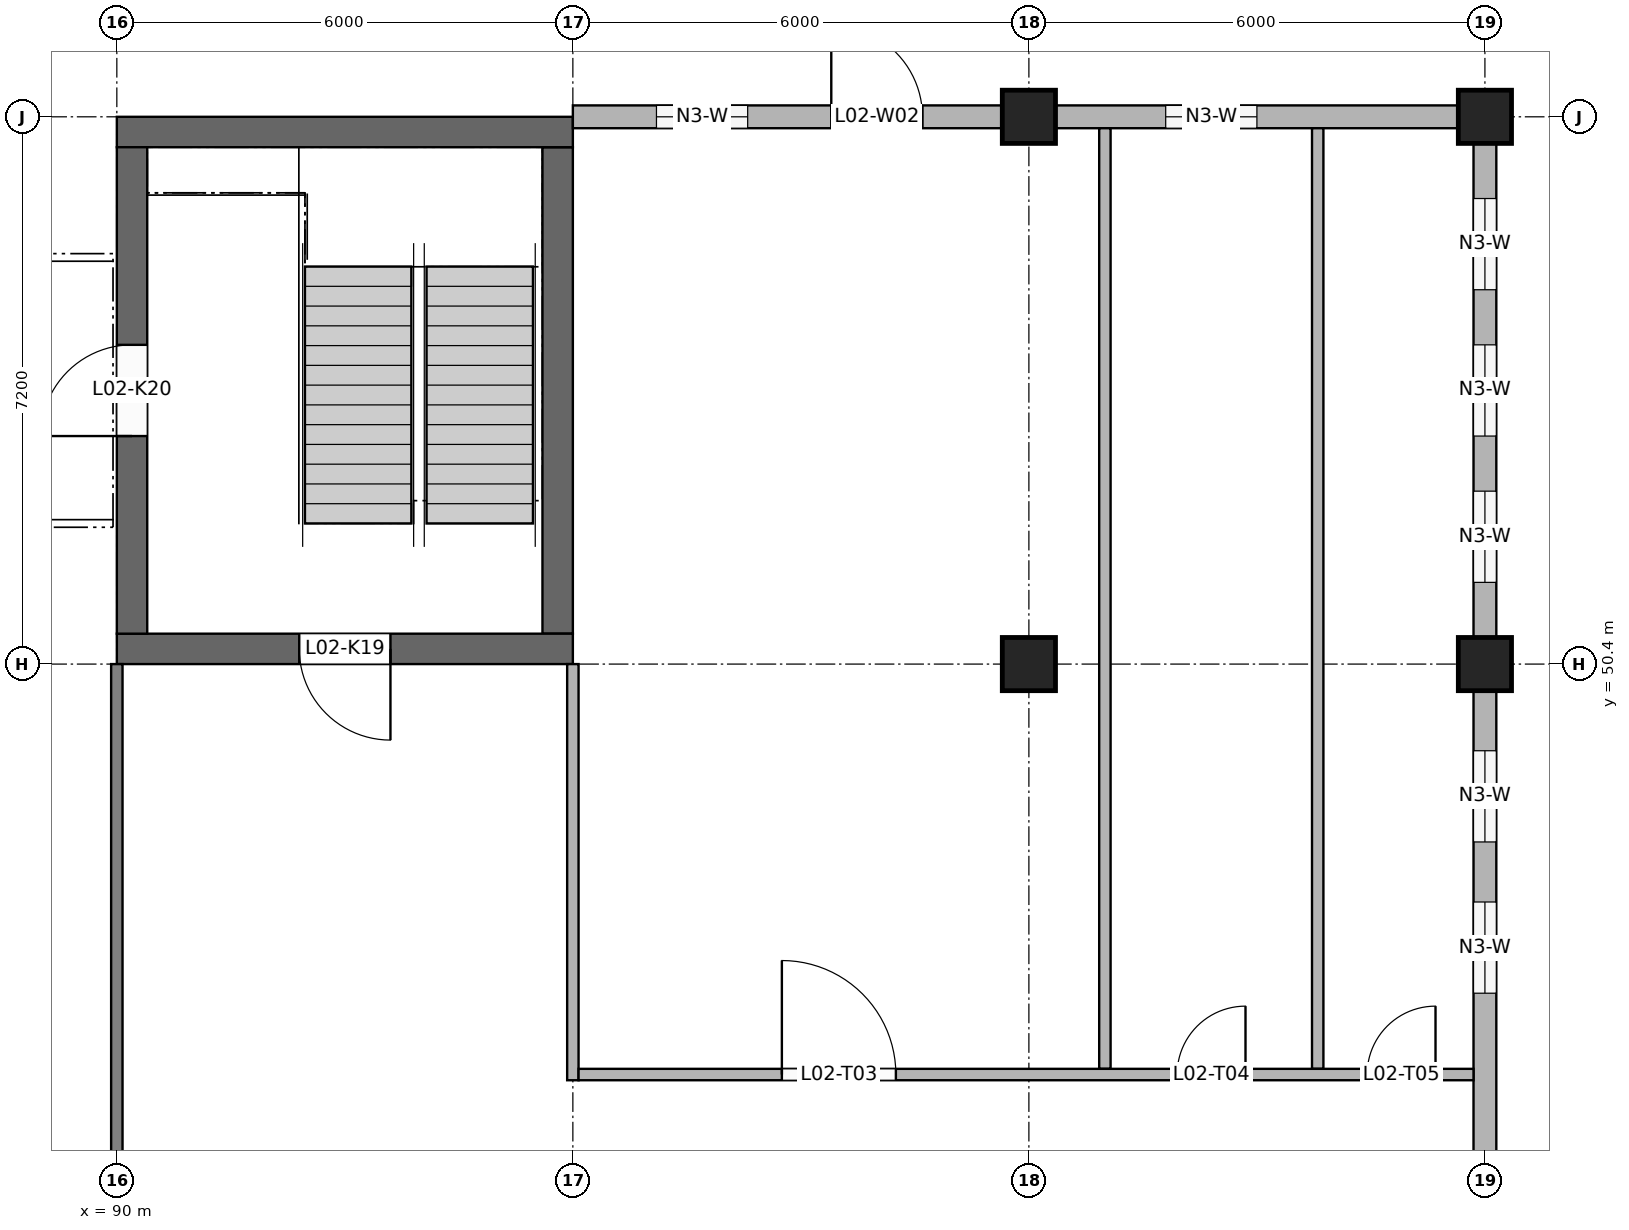
"""IFC4 building model, lengths in metres.
Left out: names, types, materials, properties, quantities, classifications, styles, units other than length and angle.
Written with IfcOpenShell. Run it as: python <this file> out.ifc"""

import sys

from ifc_helpers import new_model, si_unit, direction, frame, frame_2d, origin, origin_2d, place, context, subcontext, project, spatial, rectangle, extrude, element, fill, save


model = new_model("IFC4")
c1 = context("Model", 3, precision=1e-05, world=origin(), true_north=direction((0.0, 1.0)))
c2 = subcontext(c1, "Body", "Model", "MODEL_VIEW")
j1 = project(units=[si_unit("LENGTHUNIT", "METRE"), si_unit("PLANEANGLEUNIT", "RADIAN")], contexts=[c1])
p1 = place(None, origin())
s1 = spatial("IfcSite", under=j1, at=p1, CompositionType="ELEMENT")
p2 = place(p1, origin())
s2 = spatial("IfcBuilding", under=s1, at=p2, CompositionType="ELEMENT")
p3 = place(p2, frame((0.0, 0.0, 8.4)))
s3 = spatial("IfcBuildingStorey", under=s2, at=p3, CompositionType="ELEMENT", Elevation=8.4)
p4 = place(p3, frame((90.0, 50.6, 0.0), z_axis=(0.0, 0.0, 1.0), x_axis=(1.0, 0.0, 0.0)))
e1 = element("IfcWall", 1, at=p4, inside=s3, PredefinedType="SHEAR", context=c2, shape_type="SweptSolid", body=[
    extrude(rectangle(XDim=6.0, YDim=0.4, at=frame_2d((3.0, 0.0))), origin(), (0.0, 0.0, 1.0), 4.0),
])
p5 = place(p4, frame((2.4, 0.0, 0.0)))
e2 = element("IfcOpeningElement", 2, at=p5, cuts=e1, PredefinedType="OPENING", context=c2, shape_type="SweptSolid", body=[
    extrude(rectangle(XDim=1.2, YDim=2.1, at=frame_2d((0.6, 1.05))), frame((0.0, 0.21, 0.0), z_axis=(0.0, -1.0, 0.0), x_axis=(1.0, 0.0, 0.0)), (0.0, 0.0, 1.0), 0.42),
])
p6 = place(p3, frame((90.0, 57.4, 0.0), z_axis=(0.0, 0.0, 1.0), x_axis=(1.0, 0.0, 0.0)))
e3 = element("IfcWall", 3, at=p6, inside=s3, PredefinedType="SHEAR", context=c2, shape_type="SweptSolid", body=[
    extrude(rectangle(XDim=6.0, YDim=0.4, at=frame_2d((3.0, 0.0))), origin(), (0.0, 0.0, 1.0), 4.0),
])
p7 = place(p3, frame((90.2, 50.8, 0.0), z_axis=(0.0, 0.0, 1.0), x_axis=(0.0, 1.0, 0.0)))
e4 = element("IfcWall", 4, at=p7, inside=s3, PredefinedType="SHEAR", context=c2, shape_type="SweptSolid", body=[
    extrude(rectangle(XDim=6.4, YDim=0.4, at=frame_2d((3.2, 0.0))), origin(), (0.0, 0.0, 1.0), 4.0),
])
p8 = place(p7, frame((2.6, 0.0, 0.0)))
e5 = element("IfcOpeningElement", 5, at=p8, cuts=e4, PredefinedType="OPENING", context=c2, shape_type="SweptSolid", body=[
    extrude(rectangle(XDim=1.2, YDim=2.1, at=frame_2d((0.6, 1.05))), frame((0.0, 0.21, 0.0), z_axis=(0.0, -1.0, 0.0), x_axis=(1.0, 0.0, 0.0)), (0.0, 0.0, 1.0), 0.42),
])
p9 = place(p3, frame((95.8, 50.8, 0.0), z_axis=(0.0, 0.0, 1.0), x_axis=(0.0, 1.0, 0.0)))
e6 = element("IfcWall", 6, at=p9, inside=s3, PredefinedType="SHEAR", context=c2, shape_type="SweptSolid", body=[
    extrude(rectangle(XDim=6.4, YDim=0.4, at=frame_2d((3.2, 0.0))), origin(), (0.0, 0.0, 1.0), 4.0),
])
for number, where, z_axis, x_axis in (
    (7, (102.0, 50.4, 0.0), (0.0, 0.0, 1.0), (1.0, 0.0, 0.0)),
    (8, (108.0, 50.4, 0.0), (0.0, 0.0, 1.0), (1.0, 0.0, 0.0)),
    (9, (102.0, 57.6, 0.0), (0.0, 0.0, 1.0), (1.0, 0.0, 0.0)),
    (10, (108.0, 57.6, 0.0), (0.0, 0.0, 1.0), (1.0, 0.0, 0.0)),
):
    element("IfcColumn", number, at=place(p3, frame(where, z_axis=z_axis, x_axis=x_axis)), inside=s3, PredefinedType="COLUMN", context=c2, shape_type="SweptSolid", body=[
        extrude(rectangle(XDim=0.7, YDim=0.7, at=origin_2d()), origin(), (0.0, 0.0, 1.0), 4.0),
    ])
p10 = place(p3, frame((108.0, 43.2, 0.0), z_axis=(0.0, 0.0, 1.0), x_axis=(0.0, 1.0, 0.0)))
e11 = element("IfcWall", 11, at=p10, inside=s3, PredefinedType="SOLIDWALL", context=c2, shape_type="SweptSolid", body=[
    extrude(rectangle(XDim=6.85, YDim=0.3, at=frame_2d((3.425, 0.0))), origin(), (0.0, 0.0, 1.0), 3.1),
])
p11 = place(p10, frame((2.87, 0.0, 0.9)))
e12 = element("IfcOpeningElement", 12, at=p11, cuts=e11, PredefinedType="OPENING", context=c2, shape_type="SweptSolid", body=[
    extrude(rectangle(XDim=1.2, YDim=1.5, at=frame_2d((0.6, 0.75))), frame((0.0, 0.16, 0.0), z_axis=(0.0, -1.0, 0.0), x_axis=(1.0, 0.0, 0.0)), (0.0, 0.0, 1.0), 0.32),
])
p12 = place(p10, frame((4.86, 0.0, 0.9)))
e13 = element("IfcOpeningElement", 13, at=p12, cuts=e11, PredefinedType="OPENING", context=c2, shape_type="SweptSolid", body=[
    extrude(rectangle(XDim=1.2, YDim=1.5, at=frame_2d((0.6, 0.75))), frame((0.0, 0.16, 0.0), z_axis=(0.0, -1.0, 0.0), x_axis=(1.0, 0.0, 0.0)), (0.0, 0.0, 1.0), 0.32),
])
p13 = place(p3, frame((108.0, 50.75, 0.0), z_axis=(0.0, 0.0, 1.0), x_axis=(0.0, 1.0, 0.0)))
e14 = element("IfcWall", 14, at=p13, inside=s3, PredefinedType="SOLIDWALL", context=c2, shape_type="SweptSolid", body=[
    extrude(rectangle(XDim=6.5, YDim=0.3, at=frame_2d((3.25, 0.0))), origin(), (0.0, 0.0, 1.0), 3.2),
])
p14 = place(p13, frame((0.725, 0.0, 0.9)))
e15 = element("IfcOpeningElement", 15, at=p14, cuts=e14, PredefinedType="OPENING", context=c2, shape_type="SweptSolid", body=[
    extrude(rectangle(XDim=1.2, YDim=1.5, at=frame_2d((0.6, 0.75))), frame((0.0, 0.16, 0.0), z_axis=(0.0, -1.0, 0.0), x_axis=(1.0, 0.0, 0.0)), (0.0, 0.0, 1.0), 0.32),
])
p15 = place(p13, frame((2.65, 0.0, 0.9)))
e16 = element("IfcOpeningElement", 16, at=p15, cuts=e14, PredefinedType="OPENING", context=c2, shape_type="SweptSolid", body=[
    extrude(rectangle(XDim=1.2, YDim=1.5, at=frame_2d((0.6, 0.75))), frame((0.0, 0.16, 0.0), z_axis=(0.0, -1.0, 0.0), x_axis=(1.0, 0.0, 0.0)), (0.0, 0.0, 1.0), 0.32),
])
p16 = place(p13, frame((4.575, 0.0, 0.9)))
e17 = element("IfcOpeningElement", 17, at=p16, cuts=e14, PredefinedType="OPENING", context=c2, shape_type="SweptSolid", body=[
    extrude(rectangle(XDim=1.2, YDim=1.5, at=frame_2d((0.6, 0.75))), frame((0.0, 0.16, 0.0), z_axis=(0.0, -1.0, 0.0), x_axis=(1.0, 0.0, 0.0)), (0.0, 0.0, 1.0), 0.32),
])
p17 = place(p3, frame((96.0, 57.6, 0.0), z_axis=(0.0, 0.0, 1.0), x_axis=(1.0, 0.0, 0.0)))
e18 = element("IfcWall", 18, at=p17, inside=s3, PredefinedType="SOLIDWALL", context=c2, shape_type="SweptSolid", body=[
    extrude(rectangle(XDim=5.65, YDim=0.3, at=frame_2d((2.825, 0.0))), origin(), (0.0, 0.0, 1.0), 3.2),
])
p18 = place(p17, frame((3.4, 0.0, 0.0)))
e19 = element("IfcOpeningElement", 19, at=p18, cuts=e18, PredefinedType="OPENING", context=c2, shape_type="SweptSolid", body=[
    extrude(rectangle(XDim=1.2, YDim=2.4, at=frame_2d((0.6, 1.2))), frame((0.0, 0.16, 0.0), z_axis=(0.0, -1.0, 0.0), x_axis=(1.0, 0.0, 0.0)), (0.0, 0.0, 1.0), 0.32),
])
p19 = place(p17, frame((1.1, 0.0, 0.9)))
e20 = element("IfcOpeningElement", 20, at=p19, cuts=e18, PredefinedType="OPENING", context=c2, shape_type="SweptSolid", body=[
    extrude(rectangle(XDim=1.2, YDim=1.5, at=frame_2d((0.6, 0.75))), frame((0.0, 0.16, 0.0), z_axis=(0.0, -1.0, 0.0), x_axis=(1.0, 0.0, 0.0)), (0.0, 0.0, 1.0), 0.32),
])
p20 = place(p3, frame((102.35, 57.6, 0.0), z_axis=(0.0, 0.0, 1.0), x_axis=(1.0, 0.0, 0.0)))
e21 = element("IfcWall", 21, at=p20, inside=s3, PredefinedType="SOLIDWALL", context=c2, shape_type="SweptSolid", body=[
    extrude(rectangle(XDim=5.3, YDim=0.3, at=frame_2d((2.65, 0.0))), origin(), (0.0, 0.0, 1.0), 3.3),
])
p21 = place(p20, frame((1.45, 0.0, 0.9)))
e22 = element("IfcOpeningElement", 22, at=p21, cuts=e21, PredefinedType="OPENING", context=c2, shape_type="SweptSolid", body=[
    extrude(rectangle(XDim=1.2, YDim=1.5, at=frame_2d((0.6, 0.75))), frame((0.0, 0.16, 0.0), z_axis=(0.0, -1.0, 0.0), x_axis=(1.0, 0.0, 0.0)), (0.0, 0.0, 1.0), 0.32),
])
p22 = place(p3, frame((96.0, 44.925, 0.0), z_axis=(0.0, 0.0, 1.0), x_axis=(0.0, 1.0, 0.0)))
e23 = element("IfcWall", 23, at=p22, inside=s3, PredefinedType="PARTITIONING", context=c2, shape_type="SweptSolid", body=[
    extrude(rectangle(XDim=5.475, YDim=0.15, at=frame_2d((2.737, 0.0))), origin(), (0.0, 0.0, 1.0), 4.0),
])
for number, where, z_axis, x_axis in (
    (24, (103.0, 45.075, 0.0), (0.0, 0.0, 1.0), (0.0, 1.0, 0.0)),
    (25, (105.8, 45.075, 0.0), (0.0, 0.0, 1.0), (0.0, 1.0, 0.0)),
):
    element("IfcWall", number, at=place(p3, frame(where, z_axis=z_axis, x_axis=x_axis)), inside=s3, PredefinedType="PARTITIONING", context=c2, shape_type="SweptSolid", body=[
        extrude(rectangle(XDim=12.375, YDim=0.15, at=frame_2d((6.188, 0.0))), origin(), (0.0, 0.0, 1.0), 3.3),
    ])
p23 = place(p3, frame((96.075, 45.0, 0.0), z_axis=(0.0, 0.0, 1.0), x_axis=(1.0, 0.0, 0.0)))
e26 = element("IfcWall", 26, at=p23, inside=s3, PredefinedType="PARTITIONING", context=c2, shape_type="SweptSolid", body=[
    extrude(rectangle(XDim=11.775, YDim=0.15, at=frame_2d((5.888, 0.0))), origin(), (0.0, 0.0, 1.0), 4.0),
])
p24 = place(p23, frame((2.675, 0.0, 0.0)))
e27 = element("IfcOpeningElement", 27, at=p24, cuts=e26, PredefinedType="OPENING", context=c2, shape_type="SweptSolid", body=[
    extrude(rectangle(XDim=1.5, YDim=2.1, at=frame_2d((0.75, 1.05))), frame((0.0, 0.085, 0.0), z_axis=(0.0, -1.0, 0.0), x_axis=(1.0, 0.0, 0.0)), (0.0, 0.0, 1.0), 0.17),
])
p25 = place(p23, frame((7.875, 0.0, 0.0)))
e28 = element("IfcOpeningElement", 28, at=p25, cuts=e26, PredefinedType="OPENING", context=c2, shape_type="SweptSolid", body=[
    extrude(rectangle(XDim=0.9, YDim=2.1, at=frame_2d((0.45, 1.05))), frame((0.0, 0.085, 0.0), z_axis=(0.0, -1.0, 0.0), x_axis=(1.0, 0.0, 0.0)), (0.0, 0.0, 1.0), 0.17),
])
p26 = place(p23, frame((10.375, 0.0, 0.0)))
e29 = element("IfcOpeningElement", 29, at=p26, cuts=e26, PredefinedType="OPENING", context=c2, shape_type="SweptSolid", body=[
    extrude(rectangle(XDim=0.9, YDim=2.1, at=frame_2d((0.45, 1.05))), frame((0.0, 0.085, 0.0), z_axis=(0.0, -1.0, 0.0), x_axis=(1.0, 0.0, 0.0)), (0.0, 0.0, 1.0), 0.17),
])
p27 = place(p11, origin())
e30 = element("IfcWindow", 30, at=p27, inside=s3, PartitioningType="SINGLE_PANEL", PredefinedType="WINDOW", context=c2, shape_type="SweptSolid", body=[
    extrude(rectangle(XDim=1.2, YDim=1.5, at=frame_2d((0.6, 0.75))), frame((0.0, 0.03, 0.0), z_axis=(0.0, -1.0, 0.0), x_axis=(1.0, 0.0, 0.0)), (0.0, 0.0, 1.0), 0.06),
])
fill(e12, e30)
p28 = place(p12, origin())
e31 = element("IfcWindow", 31, at=p28, inside=s3, PartitioningType="SINGLE_PANEL", PredefinedType="WINDOW", context=c2, shape_type="SweptSolid", body=[
    extrude(rectangle(XDim=1.2, YDim=1.5, at=frame_2d((0.6, 0.75))), frame((0.0, 0.03, 0.0), z_axis=(0.0, -1.0, 0.0), x_axis=(1.0, 0.0, 0.0)), (0.0, 0.0, 1.0), 0.06),
])
fill(e13, e31)
p29 = place(p14, origin())
e32 = element("IfcWindow", 32, at=p29, inside=s3, PartitioningType="SINGLE_PANEL", PredefinedType="WINDOW", context=c2, shape_type="SweptSolid", body=[
    extrude(rectangle(XDim=1.2, YDim=1.5, at=frame_2d((0.6, 0.75))), frame((0.0, 0.03, 0.0), z_axis=(0.0, -1.0, 0.0), x_axis=(1.0, 0.0, 0.0)), (0.0, 0.0, 1.0), 0.06),
])
fill(e15, e32)
p30 = place(p15, origin())
e33 = element("IfcWindow", 33, at=p30, inside=s3, PartitioningType="SINGLE_PANEL", PredefinedType="WINDOW", context=c2, shape_type="SweptSolid", body=[
    extrude(rectangle(XDim=1.2, YDim=1.5, at=frame_2d((0.6, 0.75))), frame((0.0, 0.03, 0.0), z_axis=(0.0, -1.0, 0.0), x_axis=(1.0, 0.0, 0.0)), (0.0, 0.0, 1.0), 0.06),
])
fill(e16, e33)
p31 = place(p16, origin())
e34 = element("IfcWindow", 34, at=p31, inside=s3, PartitioningType="SINGLE_PANEL", PredefinedType="WINDOW", context=c2, shape_type="SweptSolid", body=[
    extrude(rectangle(XDim=1.2, YDim=1.5, at=frame_2d((0.6, 0.75))), frame((0.0, 0.03, 0.0), z_axis=(0.0, -1.0, 0.0), x_axis=(1.0, 0.0, 0.0)), (0.0, 0.0, 1.0), 0.06),
])
fill(e17, e34)
p32 = place(p18, origin())
e35 = element("IfcDoor", 35, at=p32, inside=s3, OperationType="SINGLE_SWING_LEFT", PredefinedType="DOOR", context=c2, shape_type="SweptSolid", body=[
    extrude(rectangle(XDim=1.2, YDim=2.4, at=frame_2d((0.6, 1.2))), frame((0.0, 0.025, 0.0), z_axis=(0.0, -1.0, 0.0), x_axis=(1.0, 0.0, 0.0)), (0.0, 0.0, 1.0), 0.05),
])
fill(e19, e35)
p33 = place(p19, origin())
e36 = element("IfcWindow", 36, at=p33, inside=s3, PartitioningType="SINGLE_PANEL", PredefinedType="WINDOW", context=c2, shape_type="SweptSolid", body=[
    extrude(rectangle(XDim=1.2, YDim=1.5, at=frame_2d((0.6, 0.75))), frame((0.0, 0.03, 0.0), z_axis=(0.0, -1.0, 0.0), x_axis=(1.0, 0.0, 0.0)), (0.0, 0.0, 1.0), 0.06),
])
fill(e20, e36)
p34 = place(p21, origin())
e37 = element("IfcWindow", 37, at=p34, inside=s3, PartitioningType="SINGLE_PANEL", PredefinedType="WINDOW", context=c2, shape_type="SweptSolid", body=[
    extrude(rectangle(XDim=1.2, YDim=1.5, at=frame_2d((0.6, 0.75))), frame((0.0, 0.03, 0.0), z_axis=(0.0, -1.0, 0.0), x_axis=(1.0, 0.0, 0.0)), (0.0, 0.0, 1.0), 0.06),
])
fill(e22, e37)
p35 = place(p5, frame((1.2, 0.0, 0.0), z_axis=(0.0, 0.0, 1.0), x_axis=(-1.0, 0.0, 0.0)))
e38 = element("IfcDoor", 38, at=p35, inside=s3, OperationType="SINGLE_SWING_LEFT", PredefinedType="DOOR", context=c2, shape_type="SweptSolid", body=[
    extrude(rectangle(XDim=1.2, YDim=2.1, at=frame_2d((0.6, 1.05))), frame((0.0, 0.025, 0.0), z_axis=(0.0, -1.0, 0.0), x_axis=(1.0, 0.0, 0.0)), (0.0, 0.0, 1.0), 0.05),
])
fill(e2, e38)
p36 = place(p8, origin())
e39 = element("IfcDoor", 39, at=p36, inside=s3, OperationType="SINGLE_SWING_LEFT", PredefinedType="DOOR", context=c2, shape_type="SweptSolid", body=[
    extrude(rectangle(XDim=1.2, YDim=2.1, at=frame_2d((0.6, 1.05))), frame((0.0, 0.025, 0.0), z_axis=(0.0, -1.0, 0.0), x_axis=(1.0, 0.0, 0.0)), (0.0, 0.0, 1.0), 0.05),
])
fill(e5, e39)
p37 = place(p24, origin())
e40 = element("IfcDoor", 40, at=p37, inside=s3, OperationType="SINGLE_SWING_LEFT", PredefinedType="DOOR", context=c2, shape_type="SweptSolid", body=[
    extrude(rectangle(XDim=1.5, YDim=2.1, at=frame_2d((0.75, 1.05))), frame((0.0, 0.025, 0.0), z_axis=(0.0, -1.0, 0.0), x_axis=(1.0, 0.0, 0.0)), (0.0, 0.0, 1.0), 0.05),
])
fill(e27, e40)
p38 = place(p25, origin())
e41 = element("IfcDoor", 41, at=p38, inside=s3, OperationType="SINGLE_SWING_RIGHT", PredefinedType="DOOR", context=c2, shape_type="SweptSolid", body=[
    extrude(rectangle(XDim=0.9, YDim=2.1, at=frame_2d((0.45, 1.05))), frame((0.0, 0.025, 0.0), z_axis=(0.0, -1.0, 0.0), x_axis=(1.0, 0.0, 0.0)), (0.0, 0.0, 1.0), 0.05),
])
fill(e28, e41)
p39 = place(p26, origin())
e42 = element("IfcDoor", 42, at=p39, inside=s3, OperationType="SINGLE_SWING_RIGHT", PredefinedType="DOOR", context=c2, shape_type="SweptSolid", body=[
    extrude(rectangle(XDim=0.9, YDim=2.1, at=frame_2d((0.45, 1.05))), frame((0.0, 0.025, 0.0), z_axis=(0.0, -1.0, 0.0), x_axis=(1.0, 0.0, 0.0)), (0.0, 0.0, 1.0), 0.05),
])
fill(e29, e42)
save(model, sys.argv[1])
